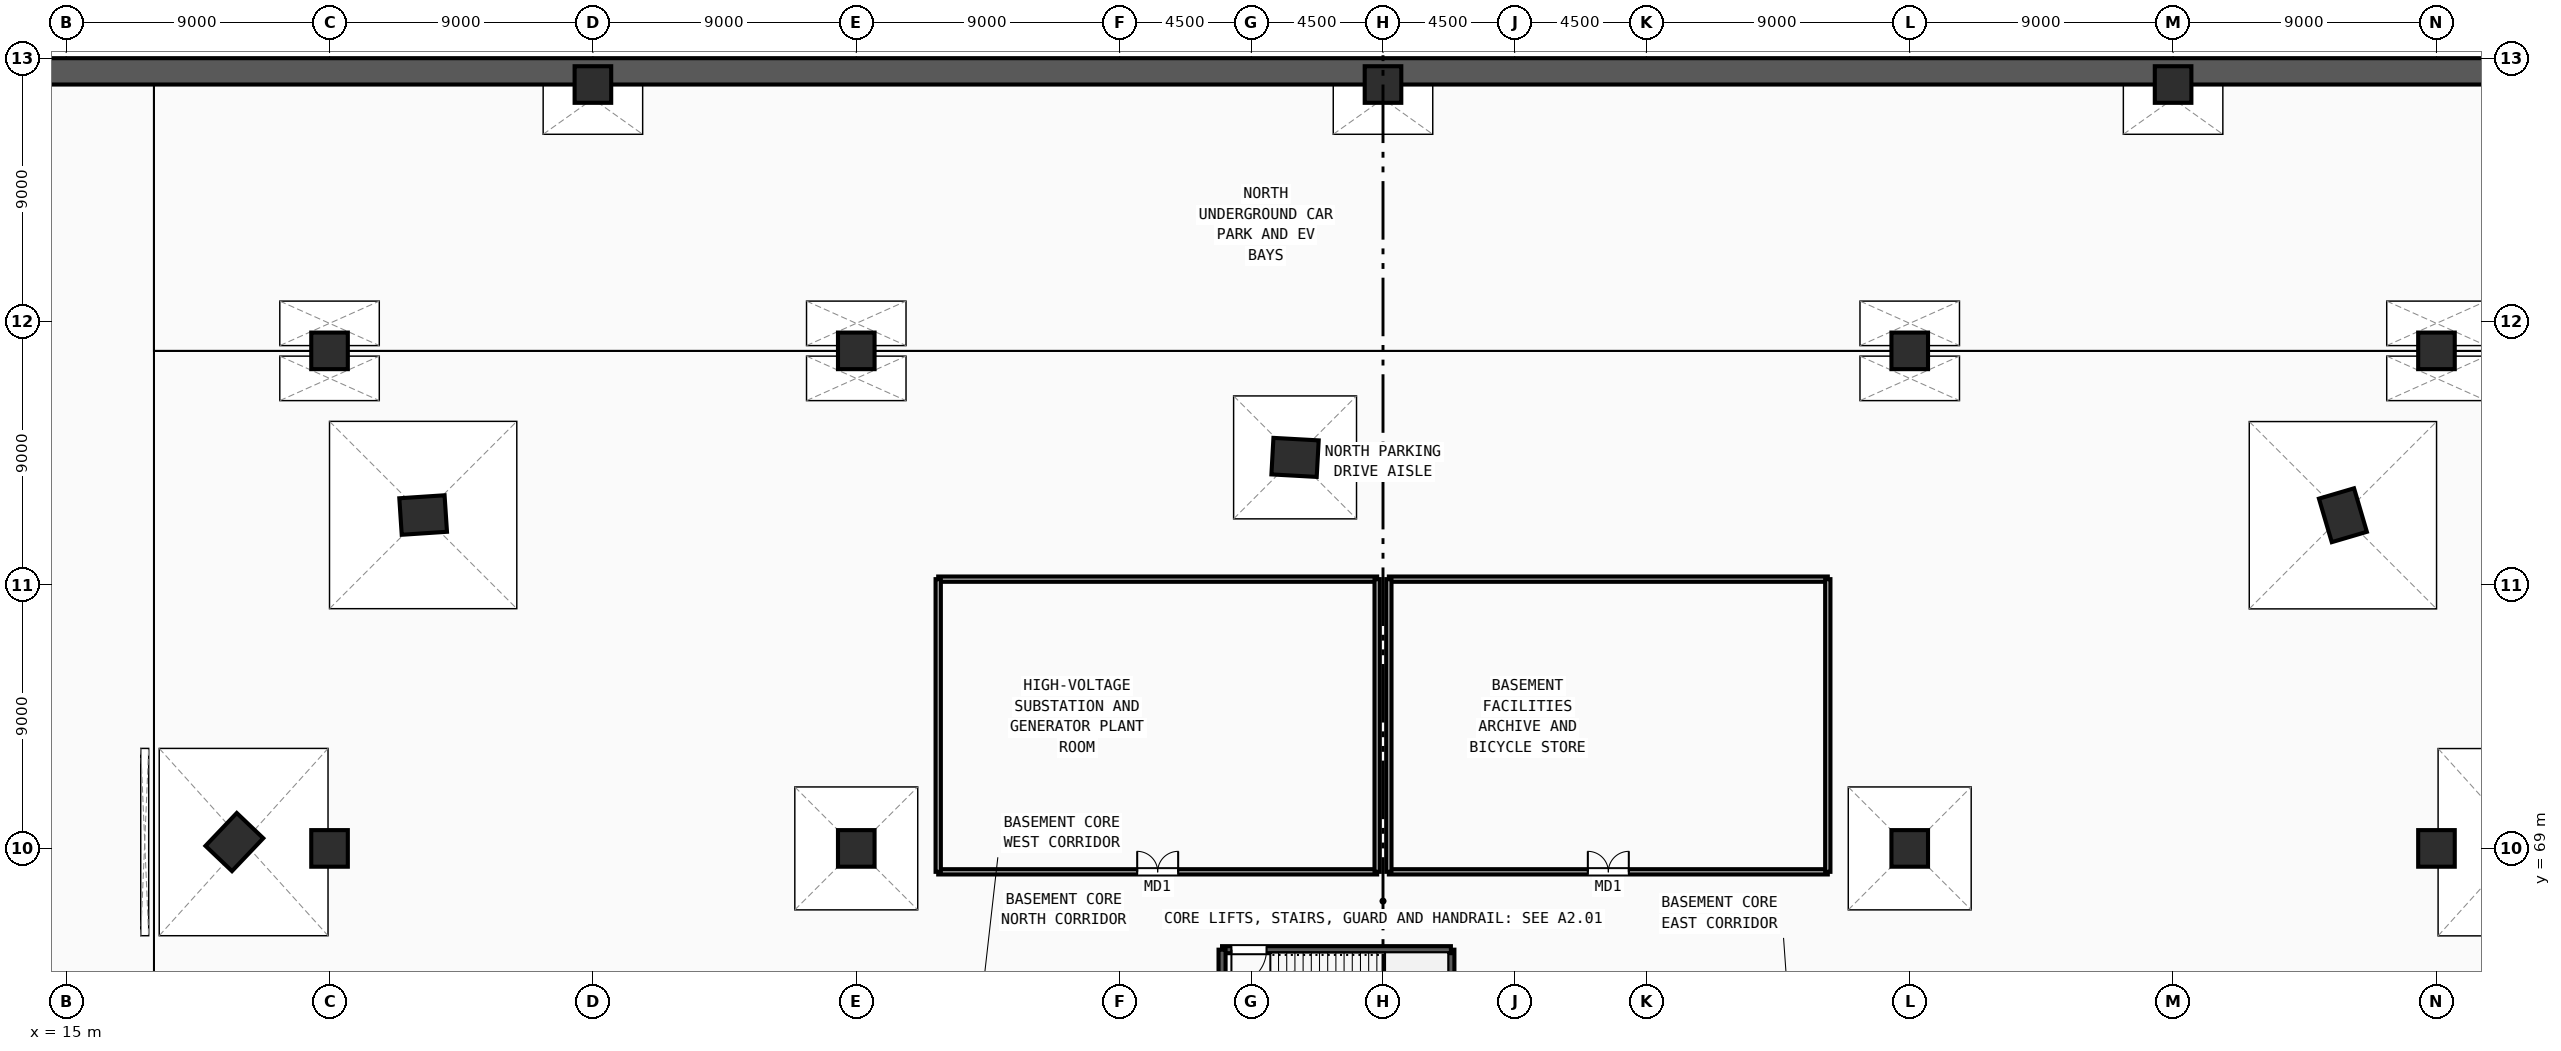
"""IFC4 building model, lengths in metres.
Left out: names, types, materials, properties, quantities, classifications, styles, units other than length and angle.
Written with IfcOpenShell. Run it as: python <this file> out.ifc"""

import sys

from ifc_helpers import new_model, si_unit, direction, frame, frame_2d, origin, origin_2d, place, context, subcontext, project, spatial, rectangle, extrude, source, transform, mapped, element, fill, save


model = new_model("IFC4")
c1 = context("Model", 3, precision=1e-05, world=origin(), true_north=direction((0.0, 1.0)))
c2 = subcontext(c1, "Body", "Model", "MODEL_VIEW")
j1 = project(units=[si_unit("LENGTHUNIT", "METRE"), si_unit("PLANEANGLEUNIT", "RADIAN")], contexts=[c1])
p1 = place(None, origin())
s1 = spatial("IfcSite", under=j1, at=p1, CompositionType="ELEMENT")
p2 = place(p1, origin())
s2 = spatial("IfcBuilding", under=s1, at=p2, CompositionType="ELEMENT")
p3 = place(p2, frame((0.0, 0.0, -9.6)))
s3 = spatial("IfcBuildingStorey", under=s2, at=p3, CompositionType="ELEMENT", Elevation=-9.6)
m1 = source(origin(), c2, "Body", "SweptSolid", [
    extrude(rectangle(XDim=1.55, YDim=1.25, at=origin_2d()), origin(), (0.0, 0.0, 1.0), 4.8),
])
for number, where, z_axis, x_axis in (
    (1, (20.748, 69.217, 0.0), (0.0, 0.0, 1.0), (0.689, 0.724, 0.0)),
    (2, (27.199, 80.391, 0.0), (0.0, 0.0, 1.0), (0.998, 0.066, 0.0)),
    (3, (92.803, 80.384, 0.0), (0.0, 0.0, 1.0), (-0.283, 0.959, 0.0)),
    (4, (56.995, 82.36, 0.0), (0.0, 0.0, 1.0), (-0.998, 0.055, 0.0)),
):
    element("IfcColumn", number, at=place(p3, frame(where, z_axis=z_axis, x_axis=x_axis)), inside=s3, PredefinedType="COLUMN", context=c2, shape_type="MappedRepresentation", body=[
        mapped(m1, transform((0.0, 0.0, 0.0), x_axis=(1.0, 0.0, 0.0), y_axis=(0.0, 1.0, 0.0), z_axis=(0.0, 0.0, 1.0), scale=1.0)),
    ])
m2 = source(origin(), c2, "Body", "SweptSolid", [
    extrude(rectangle(XDim=1.25, YDim=1.25, at=origin_2d()), origin(), (0.0, 0.0, 1.0), 4.8),
])
for number, where, z_axis, x_axis in (
    (5, (24.0, 69.0, 0.0), (0.0, 0.0, 1.0), (1.0, 0.0, 0.0)),
    (6, (42.0, 69.0, 0.0), (0.0, 0.0, 1.0), (1.0, 0.0, 0.0)),
    (7, (78.0, 69.0, 0.0), (0.0, 0.0, 1.0), (1.0, 0.0, 0.0)),
    (8, (96.0, 69.0, 0.0), (0.0, 0.0, 1.0), (1.0, 0.0, 0.0)),
    (9, (24.0, 86.0, 0.0), (0.0, 0.0, 1.0), (1.0, 0.0, 0.0)),
    (10, (42.0, 86.0, 0.0), (0.0, 0.0, 1.0), (1.0, 0.0, 0.0)),
    (11, (78.0, 86.0, 0.0), (0.0, 0.0, 1.0), (1.0, 0.0, 0.0)),
    (12, (96.0, 86.0, 0.0), (0.0, 0.0, 1.0), (1.0, 0.0, 0.0)),
    (13, (33.0, 95.1, 0.0), (0.0, 0.0, 1.0), (1.0, 0.0, 0.0)),
    (14, (60.0, 95.1, 0.0), (0.0, 0.0, 1.0), (1.0, 0.0, 0.0)),
    (15, (87.0, 95.1, 0.0), (0.0, 0.0, 1.0), (1.0, 0.0, 0.0)),
):
    element("IfcColumn", number, at=place(p3, frame(where, z_axis=z_axis, x_axis=x_axis)), inside=s3, PredefinedType="COLUMN", context=c2, shape_type="MappedRepresentation", body=[
        mapped(m2, transform((0.0, 0.0, 0.0), x_axis=(1.0, 0.0, 0.0), y_axis=(0.0, 1.0, 0.0), z_axis=(0.0, 0.0, 1.0), scale=1.0)),
    ])
p4 = place(p3, frame((6.9, 95.55, 0.0), z_axis=(0.0, 0.0, 1.0), x_axis=(1.0, 0.0, 0.0)))
e16 = element("IfcWall", 16, at=p4, inside=s3, PredefinedType="USERDEFINED", context=c2, shape_type="SweptSolid", body=[
    extrude(rectangle(XDim=106.2, YDim=0.9, at=frame_2d((53.1, 0.0))), origin(), (0.0, 0.0, 1.0), 4.5),
])
p5 = place(p3, frame((62.32, 62.1, 0.0), z_axis=(0.0, 0.0, 1.0), x_axis=(0.0, 1.0, 0.0)))
e17 = element("IfcWall", 17, at=p5, inside=s3, PredefinedType="SOLIDWALL", context=c2, shape_type="SweptSolid", body=[
    extrude(rectangle(XDim=3.44, YDim=0.24, at=frame_2d((1.72, 0.0))), origin(), (0.0, 0.0, 1.0), 4.5),
])
p6 = place(p3, frame((62.32, 65.54, 0.0), z_axis=(0.0, 0.0, 1.0), x_axis=(-1.0, 0.0, 0.0)))
e18 = element("IfcWall", 18, at=p6, inside=s3, PredefinedType="SOLIDWALL", context=c2, shape_type="SweptSolid", body=[
    extrude(rectangle(XDim=7.82, YDim=0.24, at=frame_2d((3.91, 0.0))), origin(), (0.0, 0.0, 1.0), 4.5),
])
m3 = source(origin(), c2, "Body", "SweptSolid", [
    extrude(rectangle(XDim=1.2, YDim=2.2, at=frame_2d((0.6, 1.1))), frame((0.0, 0.13, 0.0), z_axis=(0.0, -1.0, 0.0), x_axis=(1.0, 0.0, 0.0)), (0.0, 0.0, 1.0), 0.26),
])
p7 = place(p6, frame((6.3, 0.0, 0.0)))
e19 = element("IfcOpeningElement", 19, at=p7, cuts=e18, PredefinedType="OPENING", context=c2, shape_type="MappedRepresentation", body=[
    mapped(m3, transform((0.0, 0.0, 0.0), x_axis=(1.0, 0.0, 0.0), y_axis=(0.0, 1.0, 0.0), z_axis=(0.0, 0.0, 1.0), scale=1.0)),
])
p8 = place(p3, frame((54.5, 65.54, 0.0), z_axis=(0.0, 0.0, 1.0), x_axis=(0.0, -1.0, 0.0)))
e20 = element("IfcWall", 20, at=p8, inside=s3, PredefinedType="SOLIDWALL", context=c2, shape_type="SweptSolid", body=[
    extrude(rectangle(XDim=3.44, YDim=0.24, at=frame_2d((1.72, 0.0))), origin(), (0.0, 0.0, 1.0), 4.5),
])
p9 = place(p3, frame((44.8, 68.2, 0.0), z_axis=(0.0, 0.0, 1.0), x_axis=(1.0, 0.0, 0.0)))
e21 = element("IfcWall", 21, at=p9, inside=s3, PredefinedType="PARTITIONING", context=c2, shape_type="SweptSolid", body=[
    extrude(rectangle(XDim=15.0, YDim=0.18, at=frame_2d((7.5, 0.0))), origin(), (0.0, 0.0, 1.0), 4.5),
])
m4 = source(origin(), c2, "Body", "SweptSolid", [
    extrude(rectangle(XDim=1.4, YDim=2.25, at=frame_2d((0.7, 1.125))), frame((0.0, 0.1, 0.0), z_axis=(0.0, -1.0, 0.0), x_axis=(1.0, 0.0, 0.0)), (0.0, 0.0, 1.0), 0.2),
])
p10 = place(p9, frame((6.8, 0.0, 0.0)))
e22 = element("IfcOpeningElement", 22, at=p10, cuts=e21, PredefinedType="OPENING", context=c2, shape_type="MappedRepresentation", body=[
    mapped(m4, transform((0.0, 0.0, 0.0), x_axis=(1.0, 0.0, 0.0), y_axis=(0.0, 1.0, 0.0), z_axis=(0.0, 0.0, 1.0), scale=1.0)),
])
p11 = place(p3, frame((60.2, 68.2, 0.0), z_axis=(0.0, 0.0, 1.0), x_axis=(1.0, 0.0, 0.0)))
e23 = element("IfcWall", 23, at=p11, inside=s3, PredefinedType="PARTITIONING", context=c2, shape_type="SweptSolid", body=[
    extrude(rectangle(XDim=15.0, YDim=0.18, at=frame_2d((7.5, 0.0))), origin(), (0.0, 0.0, 1.0), 4.5),
])
p12 = place(p11, frame((6.8, 0.0, 0.0)))
e24 = element("IfcOpeningElement", 24, at=p12, cuts=e23, PredefinedType="OPENING", context=c2, shape_type="MappedRepresentation", body=[
    mapped(m4, transform((0.0, 0.0, 0.0), x_axis=(1.0, 0.0, 0.0), y_axis=(0.0, 1.0, 0.0), z_axis=(0.0, 0.0, 1.0), scale=1.0)),
])
p13 = place(p3, frame((44.8, 78.2, 0.0), z_axis=(0.0, 0.0, 1.0), x_axis=(1.0, 0.0, 0.0)))
e25 = element("IfcWall", 25, at=p13, inside=s3, PredefinedType="PARTITIONING", context=c2, shape_type="SweptSolid", body=[
    extrude(rectangle(XDim=15.0, YDim=0.18, at=frame_2d((7.5, 0.0))), origin(), (0.0, 0.0, 1.0), 4.5),
])
for number, where, z_axis, x_axis in (
    (26, (44.8, 68.2, 0.0), (0.0, 0.0, 1.0), (0.0, 1.0, 0.0)),
    (27, (59.8, 68.2, 0.0), (0.0, 0.0, 1.0), (0.0, 1.0, 0.0)),
):
    element("IfcWall", number, at=place(p3, frame(where, z_axis=z_axis, x_axis=x_axis)), inside=s3, PredefinedType="PARTITIONING", context=c2, shape_type="SweptSolid", body=[
        extrude(rectangle(XDim=10.0, YDim=0.18, at=frame_2d((5.0, 0.0))), origin(), (0.0, 0.0, 1.0), 4.5),
    ])
p14 = place(p3, frame((60.2, 78.2, 0.0), z_axis=(0.0, 0.0, 1.0), x_axis=(1.0, 0.0, 0.0)))
e28 = element("IfcWall", 28, at=p14, inside=s3, PredefinedType="PARTITIONING", context=c2, shape_type="SweptSolid", body=[
    extrude(rectangle(XDim=15.0, YDim=0.18, at=frame_2d((7.5, 0.0))), origin(), (0.0, 0.0, 1.0), 4.5),
])
for number, where, z_axis, x_axis in (
    (29, (60.2, 68.2, 0.0), (0.0, 0.0, 1.0), (0.0, 1.0, 0.0)),
    (30, (75.2, 68.2, 0.0), (0.0, 0.0, 1.0), (0.0, 1.0, 0.0)),
):
    element("IfcWall", number, at=place(p3, frame(where, z_axis=z_axis, x_axis=x_axis)), inside=s3, PredefinedType="PARTITIONING", context=c2, shape_type="SweptSolid", body=[
        extrude(rectangle(XDim=10.0, YDim=0.18, at=frame_2d((5.0, 0.0))), origin(), (0.0, 0.0, 1.0), 4.5),
    ])
m5 = source(origin(), c2, "Body", "SweptSolid", [
    extrude(rectangle(XDim=1.2, YDim=2.2, at=frame_2d((0.6, 1.1))), frame((0.0, 0.025, 0.0), z_axis=(0.0, -1.0, 0.0), x_axis=(1.0, 0.0, 0.0)), (0.0, 0.0, 1.0), 0.05),
])
p15 = place(p7, origin())
e31 = element("IfcDoor", 31, at=p15, inside=s3, OperationType="SINGLE_SWING_RIGHT", PredefinedType="DOOR", context=c2, shape_type="MappedRepresentation", body=[
    mapped(m5, transform((0.0, 0.0, 0.0), x_axis=(1.0, 0.0, 0.0), y_axis=(0.0, 1.0, 0.0), z_axis=(0.0, 0.0, 1.0), scale=1.0)),
])
fill(e19, e31)
m6 = source(origin(), c2, "Body", "SweptSolid", [
    extrude(rectangle(XDim=1.4, YDim=2.25, at=frame_2d((0.7, 1.125))), frame((0.0, 0.025, 0.0), z_axis=(0.0, -1.0, 0.0), x_axis=(1.0, 0.0, 0.0)), (0.0, 0.0, 1.0), 0.05),
])
p16 = place(p10, origin())
e32 = element("IfcDoor", 32, at=p16, inside=s3, OperationType="DOUBLE_DOOR_SINGLE_SWING", PredefinedType="DOOR", context=c2, shape_type="MappedRepresentation", body=[
    mapped(m6, transform((0.0, 0.0, 0.0), x_axis=(1.0, 0.0, 0.0), y_axis=(0.0, 1.0, 0.0), z_axis=(0.0, 0.0, 1.0), scale=1.0)),
])
fill(e22, e32)
p17 = place(p12, origin())
e33 = element("IfcDoor", 33, at=p17, inside=s3, OperationType="DOUBLE_DOOR_SINGLE_SWING", PredefinedType="DOOR", context=c2, shape_type="MappedRepresentation", body=[
    mapped(m6, transform((0.0, 0.0, 0.0), x_axis=(1.0, 0.0, 0.0), y_axis=(0.0, 1.0, 0.0), z_axis=(0.0, 0.0, 1.0), scale=1.0)),
])
fill(e24, e33)
save(model, sys.argv[1])
